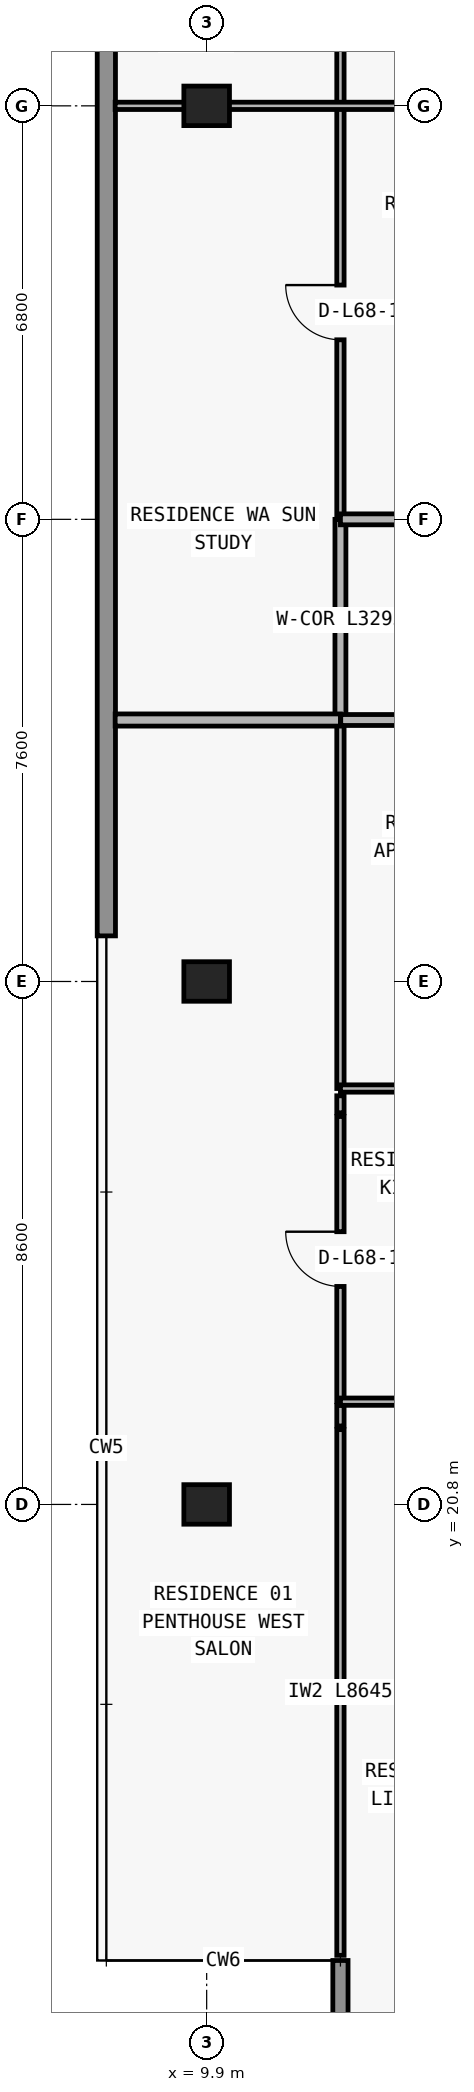
"""IFC4 building model, lengths in metres.
Left out: names, types, materials, properties, quantities, classifications, styles, units other than length and angle.
Written with IfcOpenShell. Run it as: python <this file> out.ifc"""

import sys

from ifc_helpers import new_model, si_unit, direction, frame, frame_2d, origin, origin_2d, place, context, subcontext, project, spatial, rectangle, extrude, element, fill, save


model = new_model("IFC4")
c1 = context("Model", 3, precision=1e-05, world=origin(), true_north=direction((0.0, 1.0)))
c2 = subcontext(c1, "Body", "Model", "MODEL_VIEW")
j1 = project(units=[si_unit("LENGTHUNIT", "METRE"), si_unit("PLANEANGLEUNIT", "RADIAN")], contexts=[c1])
p1 = place(None, origin())
s1 = spatial("IfcSite", under=j1, at=p1, CompositionType="ELEMENT")
p2 = place(p1, origin())
s2 = spatial("IfcBuilding", under=s1, at=p2, CompositionType="ELEMENT")
p3 = place(p2, frame((0.0, 0.0, 243.0)))
s3 = spatial("IfcBuildingStorey", under=s2, at=p3, CompositionType="ELEMENT", Elevation=243.0)
for number, where, z_axis, x_axis in (
    (1, (9.9, 20.8, 0.0), (0.0, 0.0, 1.0), (1.0, 0.0, 0.0)),
    (2, (9.9, 29.4, 0.0), (0.0, 0.0, 1.0), (1.0, 0.0, 0.0)),
    (3, (9.9, 43.8, 0.0), (0.0, 0.0, 1.0), (1.0, 0.0, 0.0)),
):
    element("IfcColumn", number, at=place(p3, frame(where, z_axis=z_axis, x_axis=x_axis)), inside=s3, PredefinedType="COLUMN", context=c2, shape_type="SweptSolid", body=[
        extrude(rectangle(XDim=0.75, YDim=0.65, at=origin_2d()), origin(), (0.0, 0.0, 1.0), 3.05),
    ])
p4 = place(p3, frame((12.1, 13.3, 0.0), z_axis=(0.0, 0.0, 1.0), x_axis=(0.0, -1.0, 0.0)))
e4 = element("IfcWall", 4, at=p4, inside=s3, PredefinedType="ELEMENTEDWALL", context=c2, shape_type="SweptSolid", body=[
    extrude(rectangle(XDim=3.45, YDim=0.25, at=frame_2d((1.725, 0.0))), origin(), (0.0, 0.0, 1.0), 3.05),
])
p5 = place(p3, frame((8.25, 30.15, 0.0), z_axis=(0.0, 0.0, 1.0), x_axis=(0.0, 1.0, 0.0)))
e5 = element("IfcWall", 5, at=p5, inside=s3, PredefinedType="STANDARD", context=c2, shape_type="SweptSolid", body=[
    extrude(rectangle(XDim=16.85, YDim=0.3, at=frame_2d((8.425, 0.0))), origin(), (0.0, 0.0, 1.0), 3.05),
])
p6 = place(p3, frame((12.1, 13.385, 0.0), z_axis=(0.0, 0.0, 1.0), x_axis=(0.0, 1.0, 0.0)))
e6 = element("IfcWall", 6, at=p6, inside=s3, PredefinedType="PARTITIONING", context=c2, shape_type="SweptSolid", body=[
    extrude(rectangle(XDim=8.645, YDim=0.12, at=frame_2d((4.323, 0.0))), origin(), (0.0, 0.0, 1.0), 3.05),
])
p7 = place(p3, frame((12.1, 22.09, 0.0), z_axis=(0.0, 0.0, 1.0), x_axis=(0.0, 1.0, 0.0)))
e7 = element("IfcWall", 7, at=p7, inside=s3, PredefinedType="PARTITIONING", context=c2, shape_type="SweptSolid", body=[
    extrude(rectangle(XDim=0.34, YDim=0.12, at=frame_2d((0.17, 0.0))), origin(), (0.0, 0.0, 1.0), 3.05),
])
p8 = place(p3, frame((12.1, 22.49, 0.0), z_axis=(0.0, 0.0, 1.0), x_axis=(0.0, 1.0, 0.0)))
e8 = element("IfcWall", 8, at=p8, inside=s3, PredefinedType="PARTITIONING", context=c2, shape_type="SweptSolid", body=[
    extrude(rectangle(XDim=4.69, YDim=0.12, at=frame_2d((2.345, 0.0))), origin(), (0.0, 0.0, 1.0), 3.05),
])
p9 = place(p8, frame((1.895, 0.0, 0.0)))
e9 = element("IfcOpeningElement", 9, at=p9, cuts=e8, PredefinedType="OPENING", context=c2, shape_type="SweptSolid", body=[
    extrude(rectangle(XDim=0.9, YDim=2.15, at=frame_2d((0.45, 1.075))), frame((0.0, 0.07, 0.0), z_axis=(0.0, -1.0, 0.0), x_axis=(1.0, 0.0, 0.0)), (0.0, 0.0, 1.0), 0.14),
])
p10 = place(p3, frame((12.1, 27.24, 0.0), z_axis=(0.0, 0.0, 1.0), x_axis=(0.0, 1.0, 0.0)))
e10 = element("IfcWall", 10, at=p10, inside=s3, PredefinedType="PARTITIONING", context=c2, shape_type="SweptSolid", body=[
    extrude(rectangle(XDim=0.28, YDim=0.12, at=frame_2d((0.14, 0.0))), origin(), (0.0, 0.0, 1.0), 3.05),
])
p11 = place(p3, frame((12.1, 27.64, 0.0), z_axis=(0.0, 0.0, 1.0), x_axis=(0.0, 1.0, 0.0)))
e11 = element("IfcWall", 11, at=p11, inside=s3, PredefinedType="PARTITIONING", context=c2, shape_type="SweptSolid", body=[
    extrude(rectangle(XDim=6.06, YDim=0.12, at=frame_2d((3.03, 0.0))), origin(), (0.0, 0.0, 1.0), 3.05),
])
p12 = place(p3, frame((12.1, 33.705, 0.0), z_axis=(0.0, 0.0, 1.0), x_axis=(0.0, 1.0, 0.0)))
e12 = element("IfcWall", 12, at=p12, inside=s3, PredefinedType="PARTITIONING", context=c2, shape_type="SweptSolid", body=[
    extrude(rectangle(XDim=3.295, YDim=0.18, at=frame_2d((1.647, 0.0))), origin(), (0.0, 0.0, 1.0), 3.05),
])
p13 = place(p3, frame((12.1, 37.005, 0.0), z_axis=(0.0, 0.0, 1.0), x_axis=(0.0, 1.0, 0.0)))
e13 = element("IfcWall", 13, at=p13, inside=s3, PredefinedType="PARTITIONING", context=c2, shape_type="SweptSolid", body=[
    extrude(rectangle(XDim=9.875, YDim=0.12, at=frame_2d((4.938, 0.0))), origin(), (0.0, 0.0, 1.0), 3.05),
])
p14 = place(p13, frame((2.948, 0.0, 0.0)))
e14 = element("IfcOpeningElement", 14, at=p14, cuts=e13, PredefinedType="OPENING", context=c2, shape_type="SweptSolid", body=[
    extrude(rectangle(XDim=0.9, YDim=2.15, at=frame_2d((0.45, 1.075))), frame((0.0, 0.07, 0.0), z_axis=(0.0, -1.0, 0.0), x_axis=(1.0, 0.0, 0.0)), (0.0, 0.0, 1.0), 0.14),
])
p15 = place(p13, frame((7.885, 0.0, 0.0)))
e15 = element("IfcOpeningElement", 15, at=p15, cuts=e13, PredefinedType="OPENING", context=c2, shape_type="SweptSolid", body=[
    extrude(rectangle(XDim=0.9, YDim=2.15, at=frame_2d((0.45, 1.075))), frame((0.0, 0.07, 0.0), z_axis=(0.0, -1.0, 0.0), x_axis=(1.0, 0.0, 0.0)), (0.0, 0.0, 1.0), 0.14),
])
p16 = place(p3, frame((12.1, 22.49, 0.0), z_axis=(0.0, 0.0, 1.0), x_axis=(1.0, 0.0, 0.0)))
e16 = element("IfcWall", 16, at=p16, inside=s3, PredefinedType="PARTITIONING", context=c2, shape_type="SweptSolid", body=[
    extrude(rectangle(XDim=3.098, YDim=0.12, at=frame_2d((1.549, 0.0))), origin(), (0.0, 0.0, 1.0), 3.05),
])
p17 = place(p16, frame((1.099, 0.0, 0.0)))
e17 = element("IfcOpeningElement", 17, at=p17, cuts=e16, PredefinedType="OPENING", context=c2, shape_type="SweptSolid", body=[
    extrude(rectangle(XDim=0.9, YDim=2.15, at=frame_2d((0.45, 1.075))), frame((0.0, 0.07, 0.0), z_axis=(0.0, -1.0, 0.0), x_axis=(1.0, 0.0, 0.0)), (0.0, 0.0, 1.0), 0.14),
])
p18 = place(p3, frame((12.1, 27.64, 0.0), z_axis=(0.0, 0.0, 1.0), x_axis=(1.0, 0.0, 0.0)))
e18 = element("IfcWall", 18, at=p18, inside=s3, PredefinedType="PARTITIONING", context=c2, shape_type="SweptSolid", body=[
    extrude(rectangle(XDim=3.098, YDim=0.12, at=frame_2d((1.549, 0.0))), origin(), (0.0, 0.0, 1.0), 3.05),
])
p19 = place(p18, frame((1.099, 0.0, 0.0)))
e19 = element("IfcOpeningElement", 19, at=p19, cuts=e18, PredefinedType="OPENING", context=c2, shape_type="SweptSolid", body=[
    extrude(rectangle(XDim=0.9, YDim=2.15, at=frame_2d((0.45, 1.075))), frame((0.0, 0.07, 0.0), z_axis=(0.0, -1.0, 0.0), x_axis=(1.0, 0.0, 0.0)), (0.0, 0.0, 1.0), 0.14),
])
p20 = place(p3, frame((8.395, 33.7, 0.0), z_axis=(0.0, 0.0, 1.0), x_axis=(1.0, 0.0, 0.0)))
e20 = element("IfcWall", 20, at=p20, inside=s3, PredefinedType="PARTITIONING", context=c2, shape_type="SweptSolid", body=[
    extrude(rectangle(XDim=3.705, YDim=0.2, at=frame_2d((1.853, 0.0))), origin(), (0.0, 0.0, 1.0), 3.05),
])
p21 = place(p3, frame((12.105, 33.7, 0.0), z_axis=(0.0, 0.0, 1.0), x_axis=(1.0, 0.0, 0.0)))
e21 = element("IfcWall", 21, at=p21, inside=s3, PredefinedType="PARTITIONING", context=c2, shape_type="SweptSolid", body=[
    extrude(rectangle(XDim=3.093, YDim=0.18, at=frame_2d((1.546, 0.0))), origin(), (0.0, 0.0, 1.0), 3.05),
])
p22 = place(p21, frame((1.046, 0.0, 0.0)))
e22 = element("IfcOpeningElement", 22, at=p22, cuts=e21, PredefinedType="OPENING", context=c2, shape_type="SweptSolid", body=[
    extrude(rectangle(XDim=1.0, YDim=2.2, at=frame_2d((0.5, 1.1))), frame((0.0, 0.1, 0.0), z_axis=(0.0, -1.0, 0.0), x_axis=(1.0, 0.0, 0.0)), (0.0, 0.0, 1.0), 0.2),
])
p23 = place(p3, frame((12.1, 37.0, 0.0), z_axis=(0.0, 0.0, 1.0), x_axis=(1.0, 0.0, 0.0)))
e23 = element("IfcWall", 23, at=p23, inside=s3, PredefinedType="PARTITIONING", context=c2, shape_type="SweptSolid", body=[
    extrude(rectangle(XDim=3.098, YDim=0.18, at=frame_2d((1.549, 0.0))), origin(), (0.0, 0.0, 1.0), 3.05),
])
p24 = place(p23, frame((1.049, 0.0, 0.0)))
e24 = element("IfcOpeningElement", 24, at=p24, cuts=e23, PredefinedType="OPENING", context=c2, shape_type="SweptSolid", body=[
    extrude(rectangle(XDim=1.0, YDim=2.2, at=frame_2d((0.5, 1.1))), frame((0.0, 0.1, 0.0), z_axis=(0.0, -1.0, 0.0), x_axis=(1.0, 0.0, 0.0)), (0.0, 0.0, 1.0), 0.2),
])
p25 = place(p3, frame((8.395, 43.8, 0.0), z_axis=(0.0, 0.0, 1.0), x_axis=(1.0, 0.0, 0.0)))
e25 = element("IfcWall", 25, at=p25, inside=s3, PredefinedType="PARTITIONING", context=c2, shape_type="SweptSolid", body=[
    extrude(rectangle(XDim=6.803, YDim=0.12, at=frame_2d((3.401, 0.0))), origin(), (0.0, 0.0, 1.0), 2.418),
])
p26 = place(p25, frame((4.804, 0.0, 0.0)))
e26 = element("IfcOpeningElement", 26, at=p26, cuts=e25, PredefinedType="OPENING", context=c2, shape_type="SweptSolid", body=[
    extrude(rectangle(XDim=0.9, YDim=2.15, at=frame_2d((0.45, 1.075))), frame((0.0, 0.07, 0.0), z_axis=(0.0, -1.0, 0.0), x_axis=(1.0, 0.0, 0.0)), (0.0, 0.0, 1.0), 0.14),
])
p27 = place(p9, origin())
e27 = element("IfcDoor", 27, at=p27, inside=s3, OperationType="SINGLE_SWING_RIGHT", PredefinedType="DOOR", context=c2, shape_type="SweptSolid", body=[
    extrude(rectangle(XDim=0.9, YDim=2.15, at=frame_2d((0.45, 1.075))), frame((0.0, 0.025, 0.0), z_axis=(0.0, -1.0, 0.0), x_axis=(1.0, 0.0, 0.0)), (0.0, 0.0, 1.0), 0.05),
])
fill(e9, e27)
p28 = place(p14, origin())
e28 = element("IfcDoor", 28, at=p28, inside=s3, OperationType="SINGLE_SWING_RIGHT", PredefinedType="DOOR", context=c2, shape_type="SweptSolid", body=[
    extrude(rectangle(XDim=0.9, YDim=2.15, at=frame_2d((0.45, 1.075))), frame((0.0, 0.025, 0.0), z_axis=(0.0, -1.0, 0.0), x_axis=(1.0, 0.0, 0.0)), (0.0, 0.0, 1.0), 0.05),
])
fill(e14, e28)
save(model, sys.argv[1])
